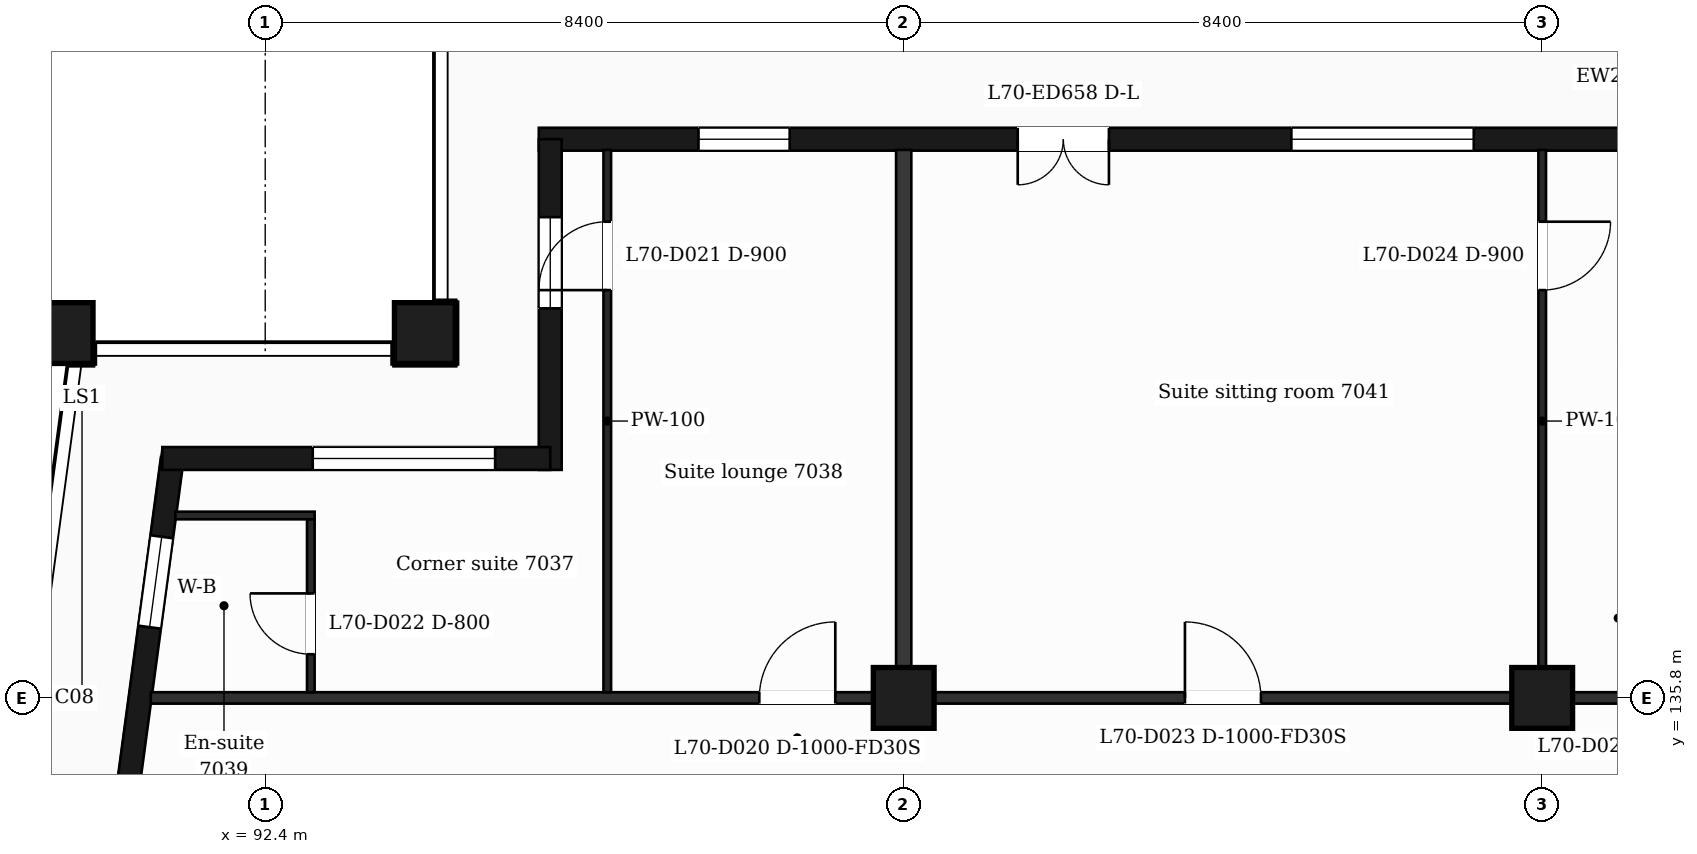
"""IFC4 building model, lengths in metres.
Left out: names, types, materials, properties, quantities, classifications, styles, units other than length and angle.
Written with IfcOpenShell. Run it as: python <this file> out.ifc"""

import sys

from ifc_helpers import new_model, si_unit, direction, frame, frame_2d, origin, origin_2d, place, context, subcontext, project, spatial, rectangle, extrude, element, fill, save


model = new_model("IFC4")
c1 = context("Model", 3, precision=1e-05, world=origin(), true_north=direction((0.0, 1.0)))
c2 = subcontext(c1, "Body", "Model", "MODEL_VIEW")
j1 = project(units=[si_unit("LENGTHUNIT", "METRE"), si_unit("PLANEANGLEUNIT", "RADIAN")], contexts=[c1])
p1 = place(None, origin())
s1 = spatial("IfcSite", under=j1, at=p1, CompositionType="ELEMENT")
p2 = place(p1, origin())
s2 = spatial("IfcBuilding", under=s1, at=p2, CompositionType="ELEMENT")
p3 = place(p2, frame((0.0, 0.0, 288.6)))
s3 = spatial("IfcBuildingStorey", under=s2, at=p3, CompositionType="ELEMENT", Elevation=288.6)
for number, where, z_axis, x_axis in (
    (1, (94.5, 140.6, 0.0), (0.0, 0.0, 1.0), (1.0, 0.0, 0.0)),
    (2, (89.735, 140.6, 0.0), (0.0, 0.0, 1.0), (1.0, 0.0, 0.0)),
    (3, (100.8, 135.8, 0.0), (0.0, 0.0, 1.0), (1.0, 0.0, 0.0)),
    (4, (109.2, 135.8, 0.0), (0.0, 0.0, 1.0), (1.0, 0.0, 0.0)),
):
    element("IfcColumn", number, at=place(p3, frame(where, z_axis=z_axis, x_axis=x_axis)), inside=s3, PredefinedType="COLUMN", context=c2, shape_type="SweptSolid", body=[
        extrude(rectangle(XDim=0.8, YDim=0.8, at=origin_2d()), origin(), (0.0, 0.0, 1.0), 3.7),
    ])
p4 = place(p3, frame((91.177, 138.95, 0.0), z_axis=(0.0, 0.0, 1.0), x_axis=(-0.133426664613, -0.991058689065, 0.0)))
e5 = element("IfcWall", 5, at=p4, inside=s3, PredefinedType="SOLIDWALL", context=c2, shape_type="SweptSolid", body=[
    extrude(rectangle(XDim=6.609, YDim=0.3, at=frame_2d((3.305, 0.0))), origin(), (0.0, 0.0, 1.0), 3.38),
])
p5 = place(p4, frame((1.039, 0.0, 0.9)))
e6 = element("IfcOpeningElement", 6, at=p5, cuts=e5, PredefinedType="OPENING", context=c2, shape_type="SweptSolid", body=[
    extrude(rectangle(XDim=1.2, YDim=2.1, at=frame_2d((0.6, 1.05))), frame((0.0, 0.16, 0.0), z_axis=(0.0, -1.0, 0.0), x_axis=(1.0, 0.0, 0.0)), (0.0, 0.0, 1.0), 0.32),
])
p6 = place(p4, frame((4.294, 0.0, 0.0)))
e7 = element("IfcOpeningElement", 7, at=p6, cuts=e5, PredefinedType="OPENING", context=c2, shape_type="SweptSolid", body=[
    extrude(rectangle(XDim=1.2, YDim=2.4, at=frame_2d((0.6, 1.2))), frame((0.0, 0.16, 0.0), z_axis=(0.0, -1.0, 0.0), x_axis=(1.0, 0.0, 0.0)), (0.0, 0.0, 1.0), 0.32),
])
p7 = place(p3, frame((110.4, 143.15, 0.0), z_axis=(0.0, 0.0, 1.0), x_axis=(-1.0, 0.0, 0.0)))
e8 = element("IfcWall", 8, at=p7, inside=s3, PredefinedType="SOLIDWALL", context=c2, shape_type="SweptSolid", body=[
    extrude(rectangle(XDim=14.4, YDim=0.3, at=frame_2d((7.2, 0.0))), origin(), (0.0, 0.0, 1.0), 3.38),
])
p8 = place(p7, frame((2.1, 0.0, 0.9)))
e9 = element("IfcOpeningElement", 9, at=p8, cuts=e8, PredefinedType="OPENING", context=c2, shape_type="SweptSolid", body=[
    extrude(rectangle(XDim=2.4, YDim=2.1, at=frame_2d((1.2, 1.05))), frame((0.0, 0.16, 0.0), z_axis=(0.0, -1.0, 0.0), x_axis=(1.0, 0.0, 0.0)), (0.0, 0.0, 1.0), 0.32),
])
p9 = place(p7, frame((6.9, 0.0, 0.0)))
e10 = element("IfcOpeningElement", 10, at=p9, cuts=e8, PredefinedType="OPENING", context=c2, shape_type="SweptSolid", body=[
    extrude(rectangle(XDim=1.2, YDim=2.4, at=frame_2d((0.6, 1.2))), frame((0.0, 0.16, 0.0), z_axis=(0.0, -1.0, 0.0), x_axis=(1.0, 0.0, 0.0)), (0.0, 0.0, 1.0), 0.32),
])
p10 = place(p7, frame((11.1, 0.0, 0.9)))
e11 = element("IfcOpeningElement", 11, at=p10, cuts=e8, PredefinedType="OPENING", context=c2, shape_type="SweptSolid", body=[
    extrude(rectangle(XDim=1.2, YDim=2.1, at=frame_2d((0.6, 1.05))), frame((0.0, 0.16, 0.0), z_axis=(0.0, -1.0, 0.0), x_axis=(1.0, 0.0, 0.0)), (0.0, 0.0, 1.0), 0.32),
])
p11 = place(p3, frame((96.15, 143.15, 0.0), z_axis=(0.0, 0.0, 1.0), x_axis=(0.0, -1.0, 0.0)))
e12 = element("IfcWall", 12, at=p11, inside=s3, PredefinedType="SOLIDWALL", context=c2, shape_type="SweptSolid", body=[
    extrude(rectangle(XDim=4.35, YDim=0.3, at=frame_2d((2.175, 0.0))), origin(), (0.0, 0.0, 1.0), 3.38),
])
p12 = place(p11, frame((1.025, 0.0, 0.9)))
e13 = element("IfcOpeningElement", 13, at=p12, cuts=e12, PredefinedType="OPENING", context=c2, shape_type="SweptSolid", body=[
    extrude(rectangle(XDim=1.2, YDim=2.1, at=frame_2d((0.6, 1.05))), frame((0.0, 0.16, 0.0), z_axis=(0.0, -1.0, 0.0), x_axis=(1.0, 0.0, 0.0)), (0.0, 0.0, 1.0), 0.32),
])
p13 = place(p3, frame((96.15, 138.95, 0.0), z_axis=(0.0, 0.0, 1.0), x_axis=(-1.0, 0.0, 0.0)))
e14 = element("IfcWall", 14, at=p13, inside=s3, PredefinedType="SOLIDWALL", context=c2, shape_type="SweptSolid", body=[
    extrude(rectangle(XDim=5.104, YDim=0.3, at=frame_2d((2.552, 0.0))), origin(), (0.0, 0.0, 1.0), 3.38),
])
p14 = place(p13, frame((0.725, 0.0, 0.9)))
e15 = element("IfcOpeningElement", 15, at=p14, cuts=e14, PredefinedType="OPENING", context=c2, shape_type="SweptSolid", body=[
    extrude(rectangle(XDim=2.4, YDim=2.1, at=frame_2d((1.2, 1.05))), frame((0.0, 0.16, 0.0), z_axis=(0.0, -1.0, 0.0), x_axis=(1.0, 0.0, 0.0)), (0.0, 0.0, 1.0), 0.32),
])
p15 = place(p3, frame((90.895, 135.8, 0.0), z_axis=(0.0, 0.0, 1.0), x_axis=(1.0, 0.0, 0.0)))
e16 = element("IfcWall", 16, at=p15, inside=s3, PredefinedType="PARTITIONING", context=c2, shape_type="SweptSolid", body=[
    extrude(rectangle(XDim=45.011, YDim=0.15, at=frame_2d((22.505, 0.0))), origin(), (0.0, 0.0, 1.0), 3.38),
])
p16 = place(p15, frame((8.005, 0.0, 0.0)))
e17 = element("IfcOpeningElement", 17, at=p16, cuts=e16, PredefinedType="OPENING", context=c2, shape_type="SweptSolid", body=[
    extrude(rectangle(XDim=1.0, YDim=2.1, at=frame_2d((0.5, 1.05))), frame((0.0, 0.085, 0.0), z_axis=(0.0, -1.0, 0.0), x_axis=(1.0, 0.0, 0.0)), (0.0, 0.0, 1.0), 0.17),
])
p17 = place(p15, frame((13.605, 0.0, 0.0)))
e18 = element("IfcOpeningElement", 18, at=p17, cuts=e16, PredefinedType="OPENING", context=c2, shape_type="SweptSolid", body=[
    extrude(rectangle(XDim=1.0, YDim=2.1, at=frame_2d((0.5, 1.05))), frame((0.0, 0.085, 0.0), z_axis=(0.0, -1.0, 0.0), x_axis=(1.0, 0.0, 0.0)), (0.0, 0.0, 1.0), 0.17),
])
p18 = place(p15, frame((29.735, 0.0, 0.0)))
e19 = element("IfcOpeningElement", 19, at=p18, cuts=e16, PredefinedType="OPENING", context=c2, shape_type="SweptSolid", body=[
    extrude(rectangle(XDim=1.0, YDim=2.1, at=frame_2d((0.5, 1.05))), frame((0.0, 0.085, 0.0), z_axis=(0.0, -1.0, 0.0), x_axis=(1.0, 0.0, 0.0)), (0.0, 0.0, 1.0), 0.17),
])
p19 = place(p15, frame((39.814, 0.0, 0.0)))
e20 = element("IfcOpeningElement", 20, at=p19, cuts=e16, PredefinedType="OPENING", context=c2, shape_type="SweptSolid", body=[
    extrude(rectangle(XDim=0.95, YDim=2.1, at=frame_2d((0.475, 1.05))), frame((0.0, 0.085, 0.0), z_axis=(0.0, -1.0, 0.0), x_axis=(1.0, 0.0, 0.0)), (0.0, 0.0, 1.0), 0.17),
])
p20 = place(p3, frame((91.218, 138.2, 0.0), z_axis=(0.0, 0.0, 1.0), x_axis=(1.0, 0.0, 0.0)))
e21 = element("IfcWall", 21, at=p20, inside=s3, PredefinedType="PARTITIONING", context=c2, shape_type="SweptSolid", body=[
    extrude(rectangle(XDim=1.832, YDim=0.1, at=frame_2d((0.916, 0.0))), origin(), (0.0, 0.0, 1.0), 3.38),
])
p21 = place(p3, frame((93.0, 135.875, 0.0), z_axis=(0.0, 0.0, 1.0), x_axis=(0.0, 1.0, 0.0)))
e22 = element("IfcWall", 22, at=p21, inside=s3, PredefinedType="PARTITIONING", context=c2, shape_type="SweptSolid", body=[
    extrude(rectangle(XDim=2.275, YDim=0.1, at=frame_2d((1.137, 0.0))), origin(), (0.0, 0.0, 1.0), 3.38),
])
p22 = place(p21, frame((0.5, 0.0, 0.0)))
e23 = element("IfcOpeningElement", 23, at=p22, cuts=e22, PredefinedType="OPENING", context=c2, shape_type="SweptSolid", body=[
    extrude(rectangle(XDim=0.8, YDim=2.1, at=frame_2d((0.4, 1.05))), frame((0.0, 0.06, 0.0), z_axis=(0.0, -1.0, 0.0), x_axis=(1.0, 0.0, 0.0)), (0.0, 0.0, 1.0), 0.12),
])
p23 = place(p3, frame((96.9, 135.875, 0.0), z_axis=(0.0, 0.0, 1.0), x_axis=(0.0, 1.0, 0.0)))
e24 = element("IfcWall", 24, at=p23, inside=s3, PredefinedType="PARTITIONING", context=c2, shape_type="SweptSolid", body=[
    extrude(rectangle(XDim=7.135, YDim=0.1, at=frame_2d((3.567, 0.0))), origin(), (0.0, 0.0, 1.0), 3.38),
])
p24 = place(p23, frame((5.29, 0.0, 0.0)))
e25 = element("IfcOpeningElement", 25, at=p24, cuts=e24, PredefinedType="OPENING", context=c2, shape_type="SweptSolid", body=[
    extrude(rectangle(XDim=0.9, YDim=2.1, at=frame_2d((0.45, 1.05))), frame((0.0, 0.06, 0.0), z_axis=(0.0, -1.0, 0.0), x_axis=(1.0, 0.0, 0.0)), (0.0, 0.0, 1.0), 0.12),
])
p25 = place(p3, frame((100.8, 135.875, 0.0), z_axis=(0.0, 0.0, 1.0), x_axis=(0.0, 1.0, 0.0)))
e26 = element("IfcWall", 26, at=p25, inside=s3, PredefinedType="PARTITIONING", context=c2, shape_type="SweptSolid", body=[
    extrude(rectangle(XDim=7.135, YDim=0.2, at=frame_2d((3.567, 0.0))), origin(), (0.0, 0.0, 1.0), 3.38),
])
p26 = place(p3, frame((109.2, 135.875, 0.0), z_axis=(0.0, 0.0, 1.0), x_axis=(0.0, 1.0, 0.0)))
e27 = element("IfcWall", 27, at=p26, inside=s3, PredefinedType="PARTITIONING", context=c2, shape_type="SweptSolid", body=[
    extrude(rectangle(XDim=7.135, YDim=0.1, at=frame_2d((3.567, 0.0))), origin(), (0.0, 0.0, 1.0), 3.38),
])
p27 = place(p26, frame((5.29, 0.0, 0.0)))
e28 = element("IfcOpeningElement", 28, at=p27, cuts=e27, PredefinedType="OPENING", context=c2, shape_type="SweptSolid", body=[
    extrude(rectangle(XDim=0.9, YDim=2.1, at=frame_2d((0.45, 1.05))), frame((0.0, 0.06, 0.0), z_axis=(0.0, -1.0, 0.0), x_axis=(1.0, 0.0, 0.0)), (0.0, 0.0, 1.0), 0.12),
])
p28 = place(p5, origin())
e29 = element("IfcWindow", 29, at=p28, inside=s3, PartitioningType="SINGLE_PANEL", PredefinedType="WINDOW", context=c2, shape_type="SweptSolid", body=[
    extrude(rectangle(XDim=1.2, YDim=2.1, at=frame_2d((0.6, 1.05))), frame((0.0, 0.03, 0.0), z_axis=(0.0, -1.0, 0.0), x_axis=(1.0, 0.0, 0.0)), (0.0, 0.0, 1.0), 0.06),
])
fill(e6, e29)
p29 = place(p8, origin())
e30 = element("IfcWindow", 30, at=p29, inside=s3, PartitioningType="SINGLE_PANEL", PredefinedType="WINDOW", context=c2, shape_type="SweptSolid", body=[
    extrude(rectangle(XDim=2.4, YDim=2.1, at=frame_2d((1.2, 1.05))), frame((0.0, 0.03, 0.0), z_axis=(0.0, -1.0, 0.0), x_axis=(1.0, 0.0, 0.0)), (0.0, 0.0, 1.0), 0.06),
])
fill(e9, e30)
p30 = place(p9, origin())
e31 = element("IfcDoor", 31, at=p30, inside=s3, OperationType="DOUBLE_DOOR_SINGLE_SWING", PredefinedType="DOOR", context=c2, shape_type="SweptSolid", body=[
    extrude(rectangle(XDim=1.2, YDim=2.4, at=frame_2d((0.6, 1.2))), frame((0.0, 0.025, 0.0), z_axis=(0.0, -1.0, 0.0), x_axis=(1.0, 0.0, 0.0)), (0.0, 0.0, 1.0), 0.05),
])
fill(e10, e31)
p31 = place(p10, origin())
e32 = element("IfcWindow", 32, at=p31, inside=s3, PartitioningType="SINGLE_PANEL", PredefinedType="WINDOW", context=c2, shape_type="SweptSolid", body=[
    extrude(rectangle(XDim=1.2, YDim=2.1, at=frame_2d((0.6, 1.05))), frame((0.0, 0.03, 0.0), z_axis=(0.0, -1.0, 0.0), x_axis=(1.0, 0.0, 0.0)), (0.0, 0.0, 1.0), 0.06),
])
fill(e11, e32)
p32 = place(p12, origin())
e33 = element("IfcWindow", 33, at=p32, inside=s3, PartitioningType="SINGLE_PANEL", PredefinedType="WINDOW", context=c2, shape_type="SweptSolid", body=[
    extrude(rectangle(XDim=1.2, YDim=2.1, at=frame_2d((0.6, 1.05))), frame((0.0, 0.03, 0.0), z_axis=(0.0, -1.0, 0.0), x_axis=(1.0, 0.0, 0.0)), (0.0, 0.0, 1.0), 0.06),
])
fill(e13, e33)
p33 = place(p14, origin())
e34 = element("IfcWindow", 34, at=p33, inside=s3, PartitioningType="SINGLE_PANEL", PredefinedType="WINDOW", context=c2, shape_type="SweptSolid", body=[
    extrude(rectangle(XDim=2.4, YDim=2.1, at=frame_2d((1.2, 1.05))), frame((0.0, 0.03, 0.0), z_axis=(0.0, -1.0, 0.0), x_axis=(1.0, 0.0, 0.0)), (0.0, 0.0, 1.0), 0.06),
])
fill(e15, e34)
p34 = place(p16, origin())
e35 = element("IfcDoor", 35, at=p34, inside=s3, OperationType="SINGLE_SWING_RIGHT", PredefinedType="DOOR", context=c2, shape_type="SweptSolid", body=[
    extrude(rectangle(XDim=1.0, YDim=2.1, at=frame_2d((0.5, 1.05))), frame((0.0, 0.025, 0.0), z_axis=(0.0, -1.0, 0.0), x_axis=(1.0, 0.0, 0.0)), (0.0, 0.0, 1.0), 0.05),
])
fill(e17, e35)
p35 = place(p24, origin())
e36 = element("IfcDoor", 36, at=p35, inside=s3, OperationType="SINGLE_SWING_LEFT", PredefinedType="DOOR", context=c2, shape_type="SweptSolid", body=[
    extrude(rectangle(XDim=0.9, YDim=2.1, at=frame_2d((0.45, 1.05))), frame((0.0, 0.025, 0.0), z_axis=(0.0, -1.0, 0.0), x_axis=(1.0, 0.0, 0.0)), (0.0, 0.0, 1.0), 0.05),
])
fill(e25, e36)
p36 = place(p22, origin())
e37 = element("IfcDoor", 37, at=p36, inside=s3, OperationType="SINGLE_SWING_RIGHT", PredefinedType="DOOR", context=c2, shape_type="SweptSolid", body=[
    extrude(rectangle(XDim=0.8, YDim=2.1, at=frame_2d((0.4, 1.05))), frame((0.0, 0.025, 0.0), z_axis=(0.0, -1.0, 0.0), x_axis=(1.0, 0.0, 0.0)), (0.0, 0.0, 1.0), 0.05),
])
fill(e23, e37)
p37 = place(p17, origin())
e38 = element("IfcDoor", 38, at=p37, inside=s3, OperationType="SINGLE_SWING_LEFT", PredefinedType="DOOR", context=c2, shape_type="SweptSolid", body=[
    extrude(rectangle(XDim=1.0, YDim=2.1, at=frame_2d((0.5, 1.05))), frame((0.0, 0.025, 0.0), z_axis=(0.0, -1.0, 0.0), x_axis=(1.0, 0.0, 0.0)), (0.0, 0.0, 1.0), 0.05),
])
fill(e18, e38)
p38 = place(p27, origin())
e39 = element("IfcDoor", 39, at=p38, inside=s3, OperationType="SINGLE_SWING_RIGHT", PredefinedType="DOOR", context=c2, shape_type="SweptSolid", body=[
    extrude(rectangle(XDim=0.9, YDim=2.1, at=frame_2d((0.45, 1.05))), frame((0.0, 0.025, 0.0), z_axis=(0.0, -1.0, 0.0), x_axis=(1.0, 0.0, 0.0)), (0.0, 0.0, 1.0), 0.05),
])
fill(e28, e39)
save(model, sys.argv[1])
